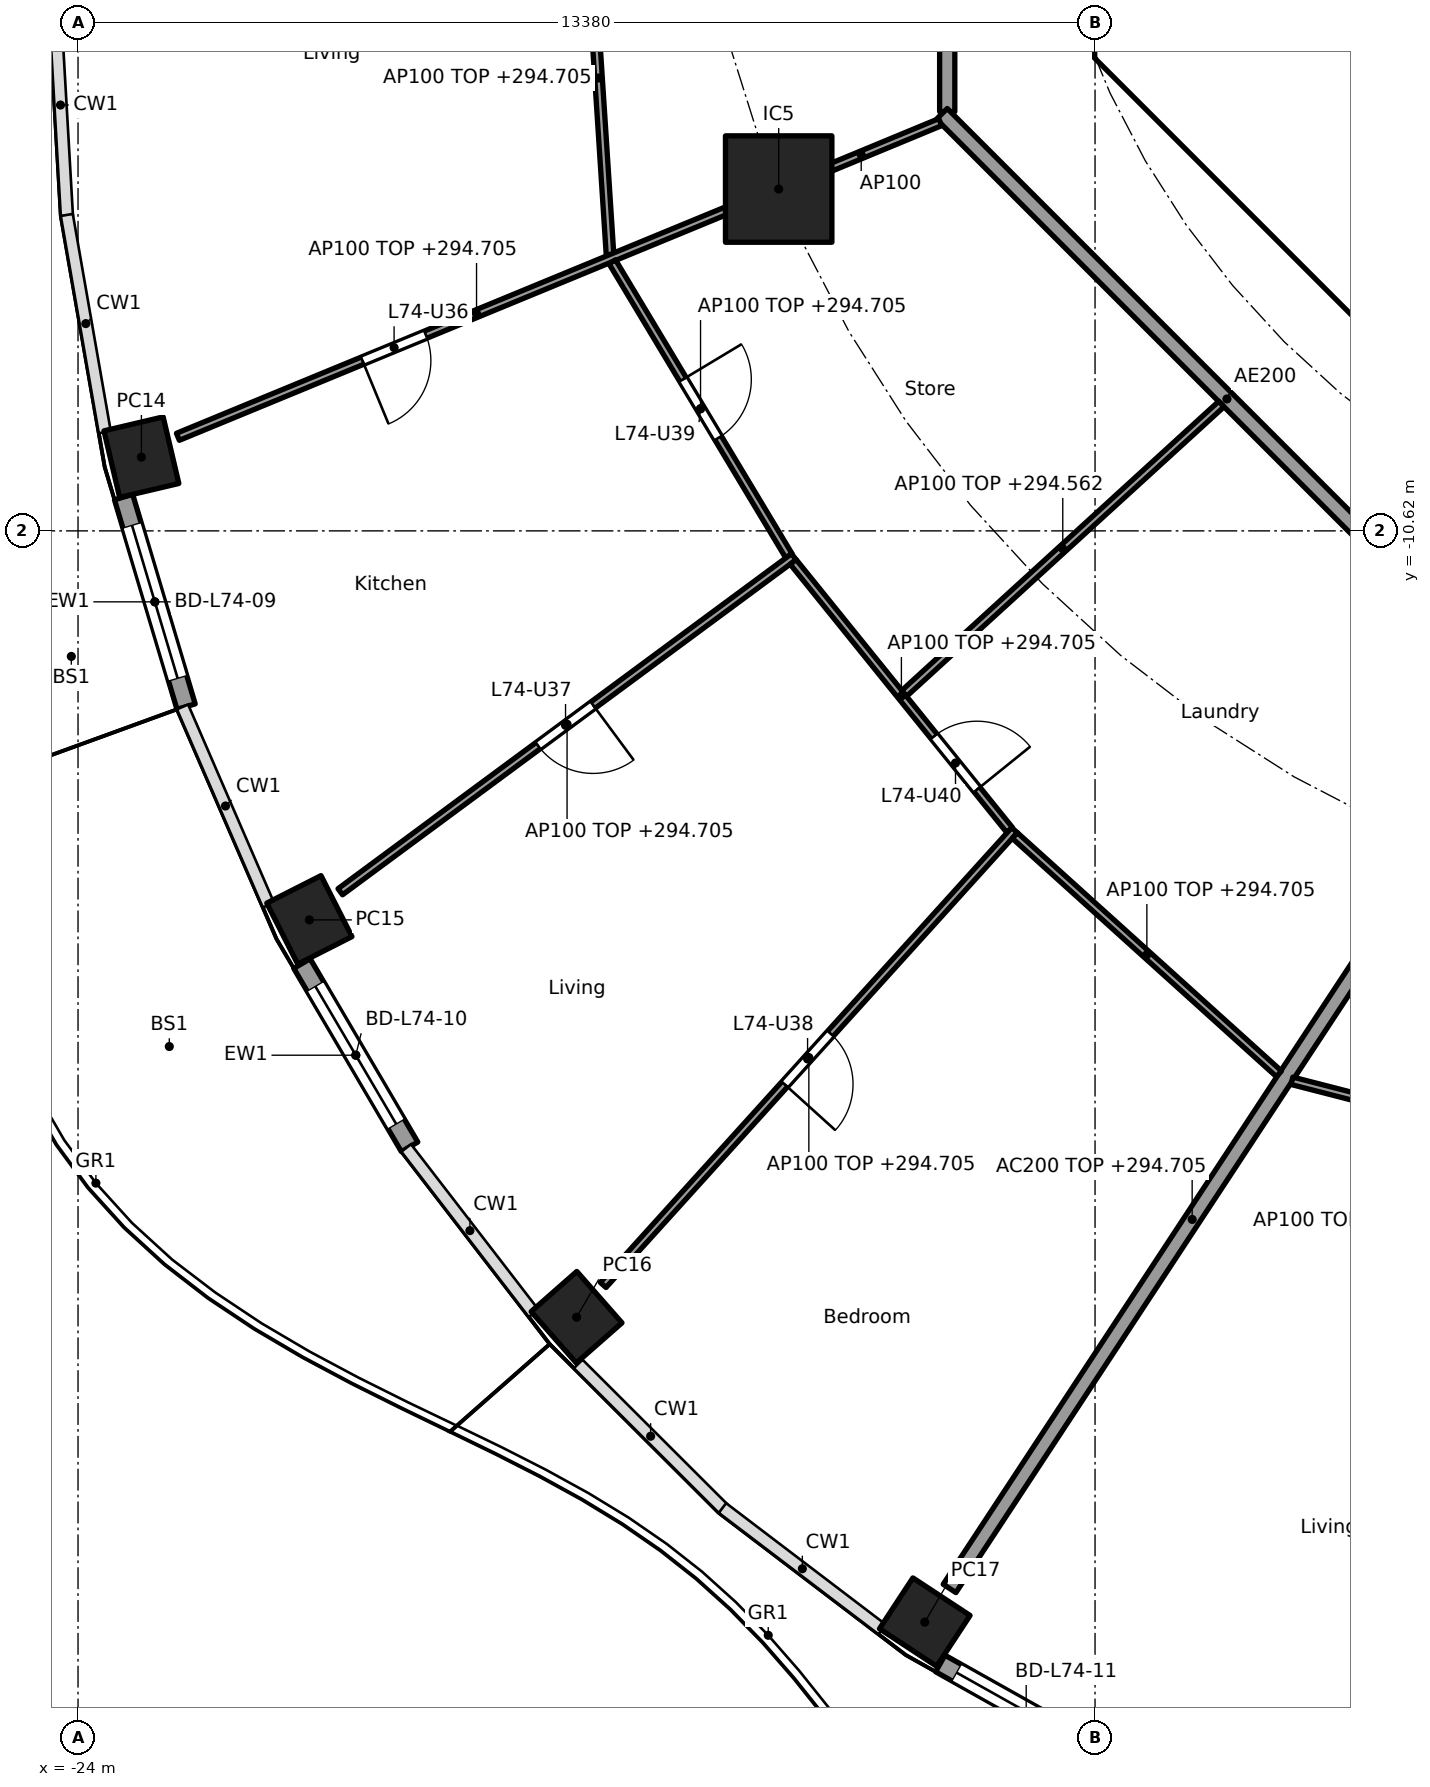
"""IFC4 building model, lengths in metres.
Left out: names, types, materials, properties, quantities, classifications, styles, units other than length and angle.
Written with IfcOpenShell. Run it as: python <this file> out.ifc"""

import sys

from ifc_helpers import new_model, si_unit, direction, frame, frame_2d, origin, origin_2d, place, context, subcontext, project, spatial, polyline, rectangle, hollow_rectangle, outline, extrude, element, fill, save


model = new_model("IFC4")
c1 = context("Model", 3, precision=1e-05, world=origin(), true_north=direction((0.0, 1.0)))
c2 = subcontext(c1, "Body", "Model", "MODEL_VIEW")
j1 = project(units=[si_unit("LENGTHUNIT", "METRE"), si_unit("PLANEANGLEUNIT", "RADIAN")], contexts=[c1])
p1 = place(None, origin())
s1 = spatial("IfcSite", under=j1, at=p1, CompositionType="ELEMENT")
p2 = place(p1, origin())
s2 = spatial("IfcBuilding", under=s1, at=p2, CompositionType="ELEMENT")
p3 = place(p2, frame((0.0, 0.0, 291.8)))
s3 = spatial("IfcBuildingStorey", under=s2, at=p3, CompositionType="ELEMENT", Elevation=291.8)
for number, where, z_axis, x_axis in (
    (1, (-23.166, -9.65, 0.0), (0.0, 0.0, 1.0), (0.229, -0.973, 0.0)),
    (2, (-20.957, -15.738, 0.0), (0.0, 0.0, 1.0), (0.452, -0.892, 0.0)),
    (3, (-17.441, -20.965, 0.0), (0.0, 0.0, 1.0), (0.66, -0.751, 0.0)),
    (4, (-12.86, -24.976, 0.0), (0.0, 0.0, 1.0), (0.836, -0.549, 0.0)),
):
    element("IfcColumn", number, at=place(p3, frame(where, z_axis=z_axis, x_axis=x_axis)), inside=s3, PredefinedType="COLUMN", context=c2, shape_type="SweptSolid", body=[
        extrude(hollow_rectangle(XDim=0.9, YDim=0.8, WallThickness=0.028, at=origin_2d()), origin(), (0.0, 0.0, 1.0), 3.7),
    ])
p4 = place(p3, frame((-14.782, -6.123, 0.0), z_axis=(0.0, 0.0, 1.0), x_axis=(1.0, 0.0, 0.0)))
e5 = element("IfcColumn", 5, at=p4, inside=s3, PredefinedType="COLUMN", context=c2, shape_type="SweptSolid", body=[
    extrude(rectangle(XDim=1.4, YDim=1.4, at=origin_2d()), origin(), (0.0, 0.0, 1.0), 3.7),
])
p5 = place(p3, frame((-22.578, -12.932, 0.0), z_axis=(0.0, 0.0, 1.0), x_axis=(-0.285899456462, 0.958259620768, 0.0)))
e6 = element("IfcWall", 6, at=p5, inside=s3, PredefinedType="SOLIDWALL", context=c2, shape_type="SweptSolid", body=[
    extrude(rectangle(XDim=2.877, YDim=0.25, at=frame_2d((1.438, 0.0))), origin(), (0.0, 0.0, 1.0), 3.44),
])
p6 = place(p5, frame((0.389, 0.0, 0.0)))
e7 = element("IfcOpeningElement", 7, at=p6, cuts=e6, PredefinedType="OPENING", context=c2, shape_type="SweptSolid", body=[
    extrude(rectangle(XDim=2.1, YDim=2.4, at=frame_2d((1.05, 1.2))), frame((0.0, 0.135, 0.0), z_axis=(0.0, -1.0, 0.0), x_axis=(1.0, 0.0, 0.0)), (0.0, 0.0, 1.0), 0.27),
])
p7 = place(p3, frame((-19.638, -18.724, 0.0), z_axis=(0.0, 0.0, 1.0), x_axis=(-0.506371364425, 0.862315511452, 0.0)))
e8 = element("IfcWall", 8, at=p7, inside=s3, PredefinedType="SOLIDWALL", context=c2, shape_type="SweptSolid", body=[
    extrude(rectangle(XDim=2.796, YDim=0.25, at=frame_2d((1.398, 0.0))), origin(), (0.0, 0.0, 1.0), 3.44),
])
p8 = place(p7, frame((0.348, 0.0, 0.0)))
e9 = element("IfcOpeningElement", 9, at=p8, cuts=e8, PredefinedType="OPENING", context=c2, shape_type="SweptSolid", body=[
    extrude(rectangle(XDim=2.1, YDim=2.4, at=frame_2d((1.05, 1.2))), frame((0.0, 0.135, 0.0), z_axis=(0.0, -1.0, 0.0), x_axis=(1.0, 0.0, 0.0)), (0.0, 0.0, 1.0), 0.27),
])
p9 = place(p3, frame((-10.395, -26.789, 0.0), z_axis=(0.0, 0.0, 1.0), x_axis=(-0.872115604046, 0.489299880625, 0.0)))
e10 = element("IfcWall", 10, at=p9, inside=s3, PredefinedType="SOLIDWALL", context=c2, shape_type="SweptSolid", body=[
    extrude(rectangle(XDim=2.593, YDim=0.25, at=frame_2d((1.296, 0.0))), origin(), (0.0, 0.0, 1.0), 3.44),
])
p10 = place(p9, frame((0.247, 0.0, 0.0)))
e11 = element("IfcOpeningElement", 11, at=p10, cuts=e10, PredefinedType="OPENING", context=c2, shape_type="SweptSolid", body=[
    extrude(rectangle(XDim=2.1, YDim=2.4, at=frame_2d((1.05, 1.2))), frame((0.0, 0.135, 0.0), z_axis=(0.0, -1.0, 0.0), x_axis=(1.0, 0.0, 0.0)), (0.0, 0.0, 1.0), 0.27),
])
p11 = place(p3, frame((-9.988, -4.613, 0.0), z_axis=(0.0, 0.0, 1.0), x_axis=(0.707106781187, -0.707106781187, 0.0)))
e12 = element("IfcWall", 12, at=p11, inside=s3, PredefinedType="SHEAR", context=c2, shape_type="SweptSolid", body=[
    extrude(rectangle(XDim=7.602, YDim=0.6, at=frame_2d((3.801, 0.0))), origin(), (0.0, 0.0, 1.0), 3.44),
])
p12 = place(p11, frame((6.151, 0.0, 0.0)))
e13 = element("IfcOpeningElement", 13, at=p12, cuts=e12, PredefinedType="OPENING", context=c2, shape_type="SweptSolid", body=[
    extrude(rectangle(XDim=1.1, YDim=2.1, at=frame_2d((0.55, 1.05))), frame((0.0, 0.31, 0.0), z_axis=(0.0, -1.0, 0.0), x_axis=(1.0, 0.0, 0.0)), (0.0, 0.0, 1.0), 0.62),
])
p13 = place(p3, origin())
e14 = element("IfcWall", 14, at=p13, inside=s3, PredefinedType="SHEAR", context=c2, shape_type="SweptSolid", body=[
    extrude(outline(polyline([(-10.625, -3.801), (-10.025, -3.801), (-10.025, -4.152), (-9.776, -4.401), (-10.2, -4.825), (-10.625, -4.401), (-10.625, -3.801)])), origin(), (0.0, 0.0, 1.0), 3.44),
])
p14 = place(p3, frame((-6.151, -14.824, 0.0), z_axis=(0.0, 0.0, 1.0), x_axis=(-0.549345577828, -0.835595258556, 0.0)))
e15 = element("IfcWall", 15, at=p14, inside=s3, PredefinedType="PARTITIONING", context=c2, shape_type="SweptSolid", body=[
    extrude(rectangle(XDim=11.62, YDim=0.2, at=frame_2d((5.81, 0.0))), origin(), (0.0, 0.0, 1.0), 2.905),
])
p15 = place(p3, frame((-12.565, 5.304, 0.0), z_axis=(0.0, 0.0, 1.0), x_axis=(0.0, -1.0, 0.0)))
e16 = element("IfcWall", 16, at=p15, inside=s3, PredefinedType="PARTITIONING", context=c2, shape_type="SweptSolid", body=[
    extrude(rectangle(XDim=10.409, YDim=0.2, at=frame_2d((5.205, 0.0))), origin(), (0.0, 0.0, 1.0), 3.44),
])
p16 = place(p15, frame((4.804, 0.0, 0.0)))
e17 = element("IfcOpeningElement", 17, at=p16, cuts=e16, PredefinedType="OPENING", context=c2, shape_type="SweptSolid", body=[
    extrude(rectangle(XDim=1.0, YDim=2.1, at=frame_2d((0.5, 1.05))), frame((0.0, 0.11, 0.0), z_axis=(0.0, -1.0, 0.0), x_axis=(1.0, 0.0, 0.0)), (0.0, 0.0, 1.0), 0.22),
])
p17 = place(p3, frame((-12.635, -5.134, 0.0), z_axis=(0.0, 0.0, 1.0), x_axis=(0.707106781187, -0.707106781187, 0.0)))
e18 = element("IfcWall", 18, at=p17, inside=s3, PredefinedType="PARTITIONING", context=c2, shape_type="SweptSolid", body=[
    extrude(rectangle(XDim=10.609, YDim=0.2, at=frame_2d((5.305, 0.0))), origin(), (0.0, 0.0, 1.0), 3.44),
])
p18 = place(p3, frame((-17.304, -2.338, 0.0), z_axis=(0.0, 0.0, 1.0), x_axis=(0.064981578354, -0.99788646372, 0.0)))
e19 = element("IfcWall", 19, at=p18, inside=s3, PredefinedType="PARTITIONING", context=c2, shape_type="SweptSolid", body=[
    extrude(rectangle(XDim=4.659, YDim=0.1, at=frame_2d((2.329, 0.0))), origin(), (0.0, 0.0, 1.0), 2.905),
])
p19 = place(p3, frame((-12.657, -5.243, 0.0), z_axis=(0.0, 0.0, 1.0), x_axis=(-0.923871314276, -0.382703272338, 0.0)))
e20 = element("IfcWall", 20, at=p19, inside=s3, PredefinedType="PARTITIONING", context=c2, shape_type="SweptSolid", body=[
    extrude(rectangle(XDim=2.249, YDim=0.1, at=frame_2d((1.125, 0.0))), origin(), (0.0, 0.0, 1.0), 3.44),
])
p20 = place(p3, frame((-14.828, -6.142, 0.0), z_axis=(0.0, 0.0, 1.0), x_axis=(-0.924478087429, -0.381235184451, 0.0)))
e21 = element("IfcWall", 21, at=p20, inside=s3, PredefinedType="PARTITIONING", context=c2, shape_type="SweptSolid", body=[
    extrude(rectangle(XDim=8.499, YDim=0.1, at=frame_2d((4.25, 0.0))), origin(), (0.0, 0.0, 1.0), 2.905),
])
p21 = place(p20, frame((4.973, 0.0, 0.0)))
e22 = element("IfcOpeningElement", 22, at=p21, cuts=e21, PredefinedType="OPENING", context=c2, shape_type="SweptSolid", body=[
    extrude(rectangle(XDim=0.9, YDim=2.1, at=frame_2d((0.45, 1.05))), frame((0.0, 0.06, 0.0), z_axis=(0.0, -1.0, 0.0), x_axis=(1.0, 0.0, 0.0)), (0.0, 0.0, 1.0), 0.12),
])
p22 = place(p3, frame((-16.972, -7.08, 0.0), z_axis=(0.0, 0.0, 1.0), x_axis=(0.514989049311, -0.857196756346, 0.0)))
e23 = element("IfcWall", 23, at=p22, inside=s3, PredefinedType="PARTITIONING", context=c2, shape_type="SweptSolid", body=[
    extrude(rectangle(XDim=4.512, YDim=0.1, at=frame_2d((2.256, 0.0))), origin(), (0.0, 0.0, 1.0), 2.905),
])
p23 = place(p22, frame((1.806, 0.0, 0.0)))
e24 = element("IfcOpeningElement", 24, at=p23, cuts=e23, PredefinedType="OPENING", context=c2, shape_type="SweptSolid", body=[
    extrude(rectangle(XDim=0.9, YDim=2.1, at=frame_2d((0.45, 1.05))), frame((0.0, 0.06, 0.0), z_axis=(0.0, -1.0, 0.0), x_axis=(1.0, 0.0, 0.0)), (0.0, 0.0, 1.0), 0.12),
])
p24 = place(p3, frame((-14.582, -10.96, 0.0), z_axis=(0.0, 0.0, 1.0), x_axis=(-0.804405200554, -0.594081032623, 0.0)))
e25 = element("IfcWall", 25, at=p24, inside=s3, PredefinedType="PARTITIONING", context=c2, shape_type="SweptSolid", body=[
    extrude(rectangle(XDim=7.418, YDim=0.1, at=frame_2d((3.709, 0.0))), origin(), (0.0, 0.0, 1.0), 2.905),
])
p25 = place(p24, frame((3.284, 0.0, 0.0)))
e26 = element("IfcOpeningElement", 26, at=p25, cuts=e25, PredefinedType="OPENING", context=c2, shape_type="SweptSolid", body=[
    extrude(rectangle(XDim=0.9, YDim=2.1, at=frame_2d((0.45, 1.05))), frame((0.0, 0.06, 0.0), z_axis=(0.0, -1.0, 0.0), x_axis=(1.0, 0.0, 0.0)), (0.0, 0.0, 1.0), 0.12),
])
p26 = place(p3, frame((-14.591, -11.029, 0.0), z_axis=(0.0, 0.0, 1.0), x_axis=(0.628170338674, -0.778075848237, 0.0)))
e27 = element("IfcWall", 27, at=p26, inside=s3, PredefinedType="PARTITIONING", context=c2, shape_type="SweptSolid", body=[
    extrude(rectangle(XDim=4.532, YDim=0.1, at=frame_2d((2.266, 0.0))), origin(), (0.0, 0.0, 1.0), 2.905),
])
p27 = place(p26, frame((2.949, 0.0, 0.0)))
e28 = element("IfcOpeningElement", 28, at=p27, cuts=e27, PredefinedType="OPENING", context=c2, shape_type="SweptSolid", body=[
    extrude(rectangle(XDim=0.9, YDim=2.1, at=frame_2d((0.45, 1.05))), frame((0.0, 0.06, 0.0), z_axis=(0.0, -1.0, 0.0), x_axis=(1.0, 0.0, 0.0)), (0.0, 0.0, 1.0), 0.12),
])
p28 = place(p3, frame((-8.958, -8.952, 0.0), z_axis=(0.0, 0.0, 1.0), x_axis=(-0.73876526954, -0.673962815385, 0.0)))
e29 = element("IfcWall", 29, at=p28, inside=s3, PredefinedType="PARTITIONING", context=c2, shape_type="SweptSolid", body=[
    extrude(rectangle(XDim=5.647, YDim=0.1, at=frame_2d((2.824, 0.0))), origin(), (0.0, 0.0, 1.0), 2.762),
])
p29 = place(p3, frame((-11.679, -14.557, 0.0), z_axis=(0.0, 0.0, 1.0), x_axis=(-0.670800011545, -0.741638284146, 0.0)))
e30 = element("IfcWall", 30, at=p29, inside=s3, PredefinedType="PARTITIONING", context=c2, shape_type="SweptSolid", body=[
    extrude(rectangle(XDim=8.068, YDim=0.1, at=frame_2d((4.034, 0.0))), origin(), (0.0, 0.0, 1.0), 2.905),
])
p30 = place(p29, frame((3.609, 0.0, 0.0)))
e31 = element("IfcOpeningElement", 31, at=p30, cuts=e30, PredefinedType="OPENING", context=c2, shape_type="SweptSolid", body=[
    extrude(rectangle(XDim=0.9, YDim=2.1, at=frame_2d((0.45, 1.05))), frame((0.0, 0.06, 0.0), z_axis=(0.0, -1.0, 0.0), x_axis=(1.0, 0.0, 0.0)), (0.0, 0.0, 1.0), 0.12),
])
p31 = place(p3, frame((-11.676, -14.628, 0.0), z_axis=(0.0, 0.0, 1.0), x_axis=(0.74245829867, -0.669892285921, 0.0)))
e32 = element("IfcWall", 32, at=p31, inside=s3, PredefinedType="PARTITIONING", context=c2, shape_type="SweptSolid", body=[
    extrude(rectangle(XDim=4.68, YDim=0.1, at=frame_2d((2.34, 0.0))), origin(), (0.0, 0.0, 1.0), 2.905),
])
p32 = place(p3, frame((-8.03, -17.854, 0.0), z_axis=(0.0, 0.0, 1.0), x_axis=(0.968441967324, -0.249239154077, 0.0)))
e33 = element("IfcWall", 33, at=p32, inside=s3, PredefinedType="PARTITIONING", context=c2, shape_type="SweptSolid", body=[
    extrude(rectangle(XDim=3.468, YDim=0.1, at=frame_2d((1.734, 0.0))), origin(), (0.0, 0.0, 1.0), 2.905),
])
p33 = place(p32, frame((1.284, 0.0, 0.0)))
e34 = element("IfcOpeningElement", 34, at=p33, cuts=e33, PredefinedType="OPENING", context=c2, shape_type="SweptSolid", body=[
    extrude(rectangle(XDim=0.9, YDim=2.1, at=frame_2d((0.45, 1.05))), frame((0.0, 0.06, 0.0), z_axis=(0.0, -1.0, 0.0), x_axis=(1.0, 0.0, 0.0)), (0.0, 0.0, 1.0), 0.12),
])
p34 = place(p6, origin())
e35 = element("IfcDoor", 35, at=p34, inside=s3, OperationType="SLIDING_TO_LEFT", PredefinedType="DOOR", context=c2, shape_type="SweptSolid", body=[
    extrude(rectangle(XDim=2.1, YDim=2.4, at=frame_2d((1.05, 1.2))), frame((0.0, 0.025, 0.0), z_axis=(0.0, -1.0, 0.0), x_axis=(1.0, 0.0, 0.0)), (0.0, 0.0, 1.0), 0.05),
])
fill(e7, e35)
p35 = place(p8, origin())
e36 = element("IfcDoor", 36, at=p35, inside=s3, OperationType="SLIDING_TO_LEFT", PredefinedType="DOOR", context=c2, shape_type="SweptSolid", body=[
    extrude(rectangle(XDim=2.1, YDim=2.4, at=frame_2d((1.05, 1.2))), frame((0.0, 0.025, 0.0), z_axis=(0.0, -1.0, 0.0), x_axis=(1.0, 0.0, 0.0)), (0.0, 0.0, 1.0), 0.05),
])
fill(e9, e36)
p36 = place(p10, origin())
e37 = element("IfcDoor", 37, at=p36, inside=s3, OperationType="SLIDING_TO_LEFT", PredefinedType="DOOR", context=c2, shape_type="SweptSolid", body=[
    extrude(rectangle(XDim=2.1, YDim=2.4, at=frame_2d((1.05, 1.2))), frame((0.0, 0.025, 0.0), z_axis=(0.0, -1.0, 0.0), x_axis=(1.0, 0.0, 0.0)), (0.0, 0.0, 1.0), 0.05),
])
fill(e11, e37)
p37 = place(p21, origin())
e38 = element("IfcDoor", 38, at=p37, inside=s3, OperationType="SINGLE_SWING_RIGHT", PredefinedType="DOOR", context=c2, shape_type="SweptSolid", body=[
    extrude(rectangle(XDim=0.9, YDim=2.1, at=frame_2d((0.45, 1.05))), frame((0.0, 0.025, 0.0), z_axis=(0.0, -1.0, 0.0), x_axis=(1.0, 0.0, 0.0)), (0.0, 0.0, 1.0), 0.05),
])
fill(e22, e38)
p38 = place(p25, origin())
e39 = element("IfcDoor", 39, at=p38, inside=s3, OperationType="SINGLE_SWING_LEFT", PredefinedType="DOOR", context=c2, shape_type="SweptSolid", body=[
    extrude(rectangle(XDim=0.9, YDim=2.1, at=frame_2d((0.45, 1.05))), frame((0.0, 0.025, 0.0), z_axis=(0.0, -1.0, 0.0), x_axis=(1.0, 0.0, 0.0)), (0.0, 0.0, 1.0), 0.05),
])
fill(e26, e39)
p39 = place(p30, origin())
e40 = element("IfcDoor", 40, at=p39, inside=s3, OperationType="SINGLE_SWING_RIGHT", PredefinedType="DOOR", context=c2, shape_type="SweptSolid", body=[
    extrude(rectangle(XDim=0.9, YDim=2.1, at=frame_2d((0.45, 1.05))), frame((0.0, 0.025, 0.0), z_axis=(0.0, -1.0, 0.0), x_axis=(1.0, 0.0, 0.0)), (0.0, 0.0, 1.0), 0.05),
])
fill(e31, e40)
p40 = place(p23, origin())
e41 = element("IfcDoor", 41, at=p40, inside=s3, OperationType="SINGLE_SWING_LEFT", PredefinedType="DOOR", context=c2, shape_type="SweptSolid", body=[
    extrude(rectangle(XDim=0.9, YDim=2.1, at=frame_2d((0.45, 1.05))), frame((0.0, 0.025, 0.0), z_axis=(0.0, -1.0, 0.0), x_axis=(1.0, 0.0, 0.0)), (0.0, 0.0, 1.0), 0.05),
])
fill(e24, e41)
p41 = place(p27, origin())
e42 = element("IfcDoor", 42, at=p41, inside=s3, OperationType="SINGLE_SWING_RIGHT", PredefinedType="DOOR", context=c2, shape_type="SweptSolid", body=[
    extrude(rectangle(XDim=0.9, YDim=2.1, at=frame_2d((0.45, 1.05))), frame((0.0, 0.025, 0.0), z_axis=(0.0, -1.0, 0.0), x_axis=(1.0, 0.0, 0.0)), (0.0, 0.0, 1.0), 0.05),
])
fill(e28, e42)
save(model, sys.argv[1])
